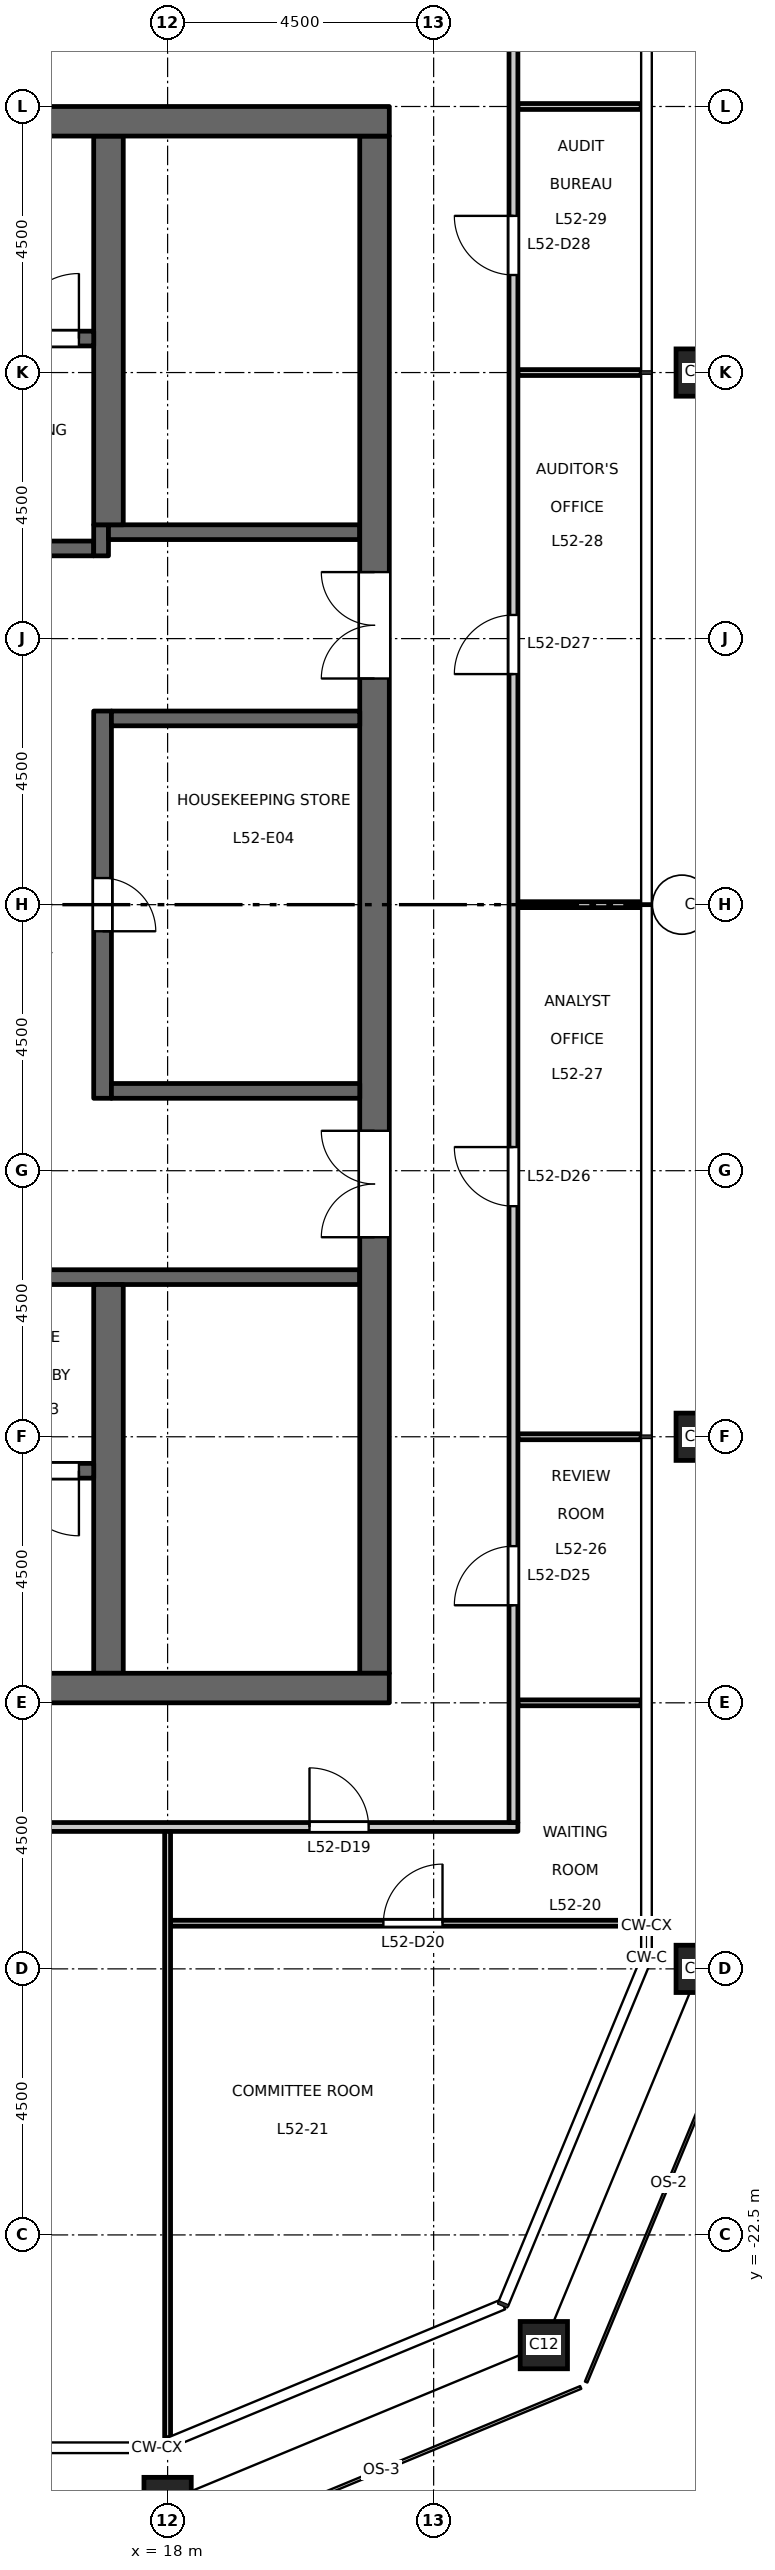
"""IFC4 building model, lengths in metres.
Left out: names, types, materials, properties, quantities, classifications, styles, units other than length and angle.
Written with IfcOpenShell. Run it as: python <this file> out.ifc"""

import sys

from ifc_helpers import new_model, si_unit, direction, frame, frame_2d, origin, origin_2d, place, context, subcontext, project, spatial, rectangle, hollow_rectangle, extrude, element, fill, save


model = new_model("IFC4")
c1 = context("Model", 3, precision=1e-05, world=origin(), true_north=direction((0.0, 1.0)))
c2 = subcontext(c1, "Body", "Model", "MODEL_VIEW")
j1 = project(units=[si_unit("LENGTHUNIT", "METRE"), si_unit("PLANEANGLEUNIT", "RADIAN")], contexts=[c1])
p1 = place(None, origin())
s1 = spatial("IfcSite", under=j1, at=p1, CompositionType="ELEMENT")
p2 = place(p1, origin())
s2 = spatial("IfcBuilding", under=s1, at=p2, CompositionType="ELEMENT")
p3 = place(p2, frame((0.0, 0.0, 242.2)))
s3 = spatial("IfcBuildingStorey", under=s2, at=p3, CompositionType="ELEMENT", Elevation=242.2)
for number, where, z_axis, x_axis in (
    (1, (18.0, -27.0, 0.0), (0.0, 0.0, 1.0), (1.0, 0.0, 0.0)),
    (2, (24.364, -24.364, 0.0), (0.0, 0.0, 1.0), (1.0, 0.0, 0.0)),
    (3, (27.0, -18.0, 0.0), (0.0, 0.0, 1.0), (1.0, 0.0, 0.0)),
    (4, (27.0, -9.0, 0.0), (0.0, 0.0, 1.0), (1.0, 0.0, 0.0)),
    (5, (27.0, 0.0, 0.0), (0.0, 0.0, 1.0), (1.0, 0.0, 0.0)),
    (6, (27.0, 9.0, 0.0), (0.0, 0.0, 1.0), (1.0, 0.0, 0.0)),
):
    element("IfcColumn", number, at=place(p3, frame(where, z_axis=z_axis, x_axis=x_axis)), inside=s3, PredefinedType="COLUMN", context=c2, shape_type="SweptSolid", body=[
        extrude(hollow_rectangle(XDim=0.8, YDim=0.8, WallThickness=0.045, at=origin_2d()), origin(), (0.0, 0.0, 1.0), 4.5),
    ])
p4 = place(p3, frame((12.15, 6.025, 0.0), z_axis=(0.0, 0.0, 1.0), x_axis=(1.0, 0.0, 0.0)))
e7 = element("IfcWall", 7, at=p4, inside=s3, PredefinedType="SHEAR", context=c2, shape_type="SweptSolid", body=[
    extrude(rectangle(XDim=4.6, YDim=0.25, at=frame_2d((2.3, 0.0))), origin(), (0.0, 0.0, 1.0), 4.35),
])
p5 = place(p4, frame((1.8, 0.0, 0.0)))
e8 = element("IfcOpeningElement", 8, at=p5, cuts=e7, PredefinedType="OPENING", context=c2, shape_type="SweptSolid", body=[
    extrude(rectangle(XDim=1.0, YDim=2.1, at=frame_2d((0.5, 1.05))), frame((0.0, 0.135, 0.0), z_axis=(0.0, -1.0, 0.0), x_axis=(1.0, 0.0, 0.0)), (0.0, 0.0, 1.0), 0.27),
])
p6 = place(p3, frame((16.875, 5.9, 0.0), z_axis=(0.0, 0.0, 1.0), x_axis=(0.0, 1.0, 0.0)))
e9 = element("IfcWall", 9, at=p6, inside=s3, PredefinedType="SHEAR", context=c2, shape_type="SweptSolid", body=[
    extrude(rectangle(XDim=0.525, YDim=0.25, at=frame_2d((0.263, 0.0))), origin(), (0.0, 0.0, 1.0), 4.35),
])
p7 = place(p3, frame((17.0, 6.3, 0.0), z_axis=(0.0, 0.0, 1.0), x_axis=(1.0, 0.0, 0.0)))
e10 = element("IfcWall", 10, at=p7, inside=s3, PredefinedType="SHEAR", context=c2, shape_type="SweptSolid", body=[
    extrude(rectangle(XDim=4.25, YDim=0.25, at=frame_2d((2.125, 0.0))), origin(), (0.0, 0.0, 1.0), 4.35),
])
p8 = place(p3, frame((12.15, -6.3, 0.0), z_axis=(0.0, 0.0, 1.0), x_axis=(1.0, 0.0, 0.0)))
e11 = element("IfcWall", 11, at=p8, inside=s3, PredefinedType="SHEAR", context=c2, shape_type="SweptSolid", body=[
    extrude(rectangle(XDim=9.1, YDim=0.25, at=frame_2d((4.55, 0.0))), origin(), (0.0, 0.0, 1.0), 4.35),
])
p9 = place(p8, frame((1.8, 0.0, 0.0)))
e12 = element("IfcOpeningElement", 12, at=p9, cuts=e11, PredefinedType="OPENING", context=c2, shape_type="SweptSolid", body=[
    extrude(rectangle(XDim=1.0, YDim=2.1, at=frame_2d((0.5, 1.05))), frame((0.0, 0.135, 0.0), z_axis=(0.0, -1.0, 0.0), x_axis=(1.0, 0.0, 0.0)), (0.0, 0.0, 1.0), 0.27),
])
p10 = place(p3, frame((21.5, -13.0, 0.0), z_axis=(0.0, 0.0, 1.0), x_axis=(0.0, 1.0, 0.0)))
e13 = element("IfcWall", 13, at=p10, inside=s3, PredefinedType="SHEAR", context=c2, shape_type="SweptSolid", body=[
    extrude(rectangle(XDim=26.0, YDim=0.5, at=frame_2d((13.0, 0.0))), origin(), (0.0, 0.0, 1.0), 4.35),
])
p11 = place(p10, frame((16.825, 0.0, 0.0)))
e14 = element("IfcOpeningElement", 14, at=p11, cuts=e13, PredefinedType="OPENING", context=c2, shape_type="SweptSolid", body=[
    extrude(rectangle(XDim=1.8, YDim=2.1, at=frame_2d((0.9, 1.05))), frame((0.0, 0.26, 0.0), z_axis=(0.0, -1.0, 0.0), x_axis=(1.0, 0.0, 0.0)), (0.0, 0.0, 1.0), 0.52),
])
p12 = place(p10, frame((7.375, 0.0, 0.0)))
e15 = element("IfcOpeningElement", 15, at=p12, cuts=e13, PredefinedType="OPENING", context=c2, shape_type="SweptSolid", body=[
    extrude(rectangle(XDim=1.8, YDim=2.1, at=frame_2d((0.9, 1.05))), frame((0.0, 0.26, 0.0), z_axis=(0.0, -1.0, 0.0), x_axis=(1.0, 0.0, 0.0)), (0.0, 0.0, 1.0), 0.52),
])
p13 = place(p3, frame((16.9, -3.275, 0.0), z_axis=(0.0, 0.0, 1.0), x_axis=(0.0, 1.0, 0.0)))
e16 = element("IfcWall", 16, at=p13, inside=s3, PredefinedType="SHEAR", context=c2, shape_type="SweptSolid", body=[
    extrude(rectangle(XDim=6.55, YDim=0.3, at=frame_2d((3.275, 0.0))), origin(), (0.0, 0.0, 1.0), 4.35),
])
p14 = place(p13, frame((2.825, 0.0, 0.0)))
e17 = element("IfcOpeningElement", 17, at=p14, cuts=e16, PredefinedType="OPENING", context=c2, shape_type="SweptSolid", body=[
    extrude(rectangle(XDim=0.9, YDim=2.1, at=frame_2d((0.45, 1.05))), frame((0.0, 0.16, 0.0), z_axis=(0.0, -1.0, 0.0), x_axis=(1.0, 0.0, 0.0)), (0.0, 0.0, 1.0), 0.32),
])
for number, where, z_axis, x_axis in (
    (18, (17.05, 3.15, 0.0), (0.0, 0.0, 1.0), (1.0, 0.0, 0.0)),
    (19, (17.05, -3.15, 0.0), (0.0, 0.0, 1.0), (1.0, 0.0, 0.0)),
):
    element("IfcWall", number, at=place(p3, frame(where, z_axis=z_axis, x_axis=x_axis)), inside=s3, PredefinedType="SHEAR", context=c2, shape_type="SweptSolid", body=[
        extrude(rectangle(XDim=4.2, YDim=0.25, at=frame_2d((2.1, 0.0))), origin(), (0.0, 0.0, 1.0), 4.35),
    ])
for number, where, z_axis, x_axis in (
    (20, (17.0, 6.425, 0.0), (0.0, 0.0, 1.0), (0.0, 1.0, 0.0)),
    (21, (17.0, -13.0, 0.0), (0.0, 0.0, 1.0), (0.0, 1.0, 0.0)),
):
    element("IfcWall", number, at=place(p3, frame(where, z_axis=z_axis, x_axis=x_axis)), inside=s3, PredefinedType="SHEAR", context=c2, shape_type="SweptSolid", body=[
        extrude(rectangle(XDim=6.575, YDim=0.5, at=frame_2d((3.288, 0.0))), origin(), (0.0, 0.0, 1.0), 4.35),
    ])
p15 = place(p3, frame((8.75, 9.575, 0.0), z_axis=(0.0, 0.0, 1.0), x_axis=(1.0, 0.0, 0.0)))
e22 = element("IfcWall", 22, at=p15, inside=s3, PredefinedType="SHEAR", context=c2, shape_type="SweptSolid", body=[
    extrude(rectangle(XDim=8.0, YDim=0.25, at=frame_2d((4.0, 0.0))), origin(), (0.0, 0.0, 1.0), 4.35),
])
p16 = place(p15, frame((6.65, 0.0, 0.0)))
e23 = element("IfcOpeningElement", 23, at=p16, cuts=e22, PredefinedType="OPENING", context=c2, shape_type="SweptSolid", body=[
    extrude(rectangle(XDim=1.1, YDim=2.1, at=frame_2d((0.55, 1.05))), frame((0.0, 0.135, 0.0), z_axis=(0.0, -1.0, 0.0), x_axis=(1.0, 0.0, 0.0)), (0.0, 0.0, 1.0), 0.27),
])
p17 = place(p3, frame((8.75, -9.575, 0.0), z_axis=(0.0, 0.0, 1.0), x_axis=(1.0, 0.0, 0.0)))
e24 = element("IfcWall", 24, at=p17, inside=s3, PredefinedType="SHEAR", context=c2, shape_type="SweptSolid", body=[
    extrude(rectangle(XDim=8.0, YDim=0.25, at=frame_2d((4.0, 0.0))), origin(), (0.0, 0.0, 1.0), 4.35),
])
p18 = place(p17, frame((6.65, 0.0, 0.0)))
e25 = element("IfcOpeningElement", 25, at=p18, cuts=e24, PredefinedType="OPENING", context=c2, shape_type="SweptSolid", body=[
    extrude(rectangle(XDim=1.1, YDim=2.1, at=frame_2d((0.55, 1.05))), frame((0.0, 0.135, 0.0), z_axis=(0.0, -1.0, 0.0), x_axis=(1.0, 0.0, 0.0)), (0.0, 0.0, 1.0), 0.27),
])
for number, where, z_axis, x_axis in (
    (26, (8.25, 13.25, 0.0), (0.0, 0.0, 1.0), (1.0, 0.0, 0.0)),
    (27, (8.25, -13.25, 0.0), (0.0, 0.0, 1.0), (1.0, 0.0, 0.0)),
):
    element("IfcWall", number, at=place(p3, frame(where, z_axis=z_axis, x_axis=x_axis)), inside=s3, PredefinedType="SHEAR", context=c2, shape_type="SweptSolid", body=[
        extrude(rectangle(XDim=13.5, YDim=0.5, at=frame_2d((6.75, 0.0))), origin(), (0.0, 0.0, 1.0), 4.35),
    ])
p19 = place(p3, frame((18.05, -17.228, 0.0), z_axis=(0.0, 0.0, 1.0), x_axis=(1.0, 0.0, 0.0)))
e28 = element("IfcWall", 28, at=p19, inside=s3, PredefinedType="PARTITIONING", context=c2, shape_type="SweptSolid", body=[
    extrude(rectangle(XDim=7.96, YDim=0.1, at=frame_2d((3.98, 0.0))), origin(), (0.0, 0.0, 1.0), 4.35),
])
p20 = place(p19, frame((3.6, 0.0, 0.0)))
e29 = element("IfcOpeningElement", 29, at=p20, cuts=e28, PredefinedType="OPENING", context=c2, shape_type="SweptSolid", body=[
    extrude(rectangle(XDim=1.0, YDim=2.1, at=frame_2d((0.5, 1.05))), frame((0.0, 0.06, 0.0), z_axis=(0.0, -1.0, 0.0), x_axis=(1.0, 0.0, 0.0)), (0.0, 0.0, 1.0), 0.12),
])
p21 = place(p3, frame((-23.925, -15.6, 0.0), z_axis=(0.0, 0.0, 1.0), x_axis=(1.0, 0.0, 0.0)))
e30 = element("IfcWall", 30, at=p21, inside=s3, PredefinedType="PARTITIONING", context=c2, shape_type="SweptSolid", body=[
    extrude(rectangle(XDim=47.85, YDim=0.15, at=frame_2d((23.925, 0.0))), origin(), (0.0, 0.0, 1.0), 4.35),
])
p22 = place(p21, frame((9.825, 0.0, 0.0)))
e31 = element("IfcOpeningElement", 31, at=p22, cuts=e30, PredefinedType="OPENING", context=c2, shape_type="SweptSolid", body=[
    extrude(rectangle(XDim=1.0, YDim=2.1, at=frame_2d((0.5, 1.05))), frame((0.0, 0.085, 0.0), z_axis=(0.0, -1.0, 0.0), x_axis=(1.0, 0.0, 0.0)), (0.0, 0.0, 1.0), 0.17),
])
p23 = place(p21, frame((18.825, 0.0, 0.0)))
e32 = element("IfcOpeningElement", 32, at=p23, cuts=e30, PredefinedType="OPENING", context=c2, shape_type="SweptSolid", body=[
    extrude(rectangle(XDim=1.0, YDim=2.1, at=frame_2d((0.5, 1.05))), frame((0.0, 0.085, 0.0), z_axis=(0.0, -1.0, 0.0), x_axis=(1.0, 0.0, 0.0)), (0.0, 0.0, 1.0), 0.17),
])
p24 = place(p21, frame((27.825, 0.0, 0.0)))
e33 = element("IfcOpeningElement", 33, at=p24, cuts=e30, PredefinedType="OPENING", context=c2, shape_type="SweptSolid", body=[
    extrude(rectangle(XDim=1.0, YDim=2.1, at=frame_2d((0.5, 1.05))), frame((0.0, 0.085, 0.0), z_axis=(0.0, -1.0, 0.0), x_axis=(1.0, 0.0, 0.0)), (0.0, 0.0, 1.0), 0.17),
])
p25 = place(p21, frame((36.825, 0.0, 0.0)))
e34 = element("IfcOpeningElement", 34, at=p25, cuts=e30, PredefinedType="OPENING", context=c2, shape_type="SweptSolid", body=[
    extrude(rectangle(XDim=1.0, YDim=2.1, at=frame_2d((0.5, 1.05))), frame((0.0, 0.085, 0.0), z_axis=(0.0, -1.0, 0.0), x_axis=(1.0, 0.0, 0.0)), (0.0, 0.0, 1.0), 0.17),
])
p26 = place(p21, frame((2.475, 0.0, 0.0)))
e35 = element("IfcOpeningElement", 35, at=p26, cuts=e30, PredefinedType="OPENING", context=c2, shape_type="SweptSolid", body=[
    extrude(rectangle(XDim=1.0, YDim=2.1, at=frame_2d((0.5, 1.05))), frame((0.0, 0.085, 0.0), z_axis=(0.0, -1.0, 0.0), x_axis=(1.0, 0.0, 0.0)), (0.0, 0.0, 1.0), 0.17),
])
p27 = place(p21, frame((44.325, 0.0, 0.0)))
e36 = element("IfcOpeningElement", 36, at=p27, cuts=e30, PredefinedType="OPENING", context=c2, shape_type="SweptSolid", body=[
    extrude(rectangle(XDim=1.0, YDim=2.1, at=frame_2d((0.5, 1.05))), frame((0.0, 0.085, 0.0), z_axis=(0.0, -1.0, 0.0), x_axis=(1.0, 0.0, 0.0)), (0.0, 0.0, 1.0), 0.17),
])
p28 = place(p3, frame((23.925, -13.5, 0.0), z_axis=(0.0, 0.0, 1.0), x_axis=(1.0, 0.0, 0.0)))
e37 = element("IfcWall", 37, at=p28, inside=s3, PredefinedType="PARTITIONING", context=c2, shape_type="SweptSolid", body=[
    extrude(rectangle(XDim=2.085, YDim=0.1, at=frame_2d((1.042, 0.0))), origin(), (0.0, 0.0, 1.0), 3.95),
])
for number, where, z_axis, x_axis in (
    (38, (23.925, -9.0, 0.0), (0.0, 0.0, 1.0), (1.0, 0.0, 0.0)),
    (39, (23.925, 0.0, 0.0), (0.0, 0.0, 1.0), (1.0, 0.0, 0.0)),
    (40, (23.925, 9.0, 0.0), (0.0, 0.0, 1.0), (1.0, 0.0, 0.0)),
    (41, (23.925, 13.5, 0.0), (0.0, 0.0, 1.0), (1.0, 0.0, 0.0)),
):
    element("IfcWall", number, at=place(p3, frame(where, z_axis=z_axis, x_axis=x_axis)), inside=s3, PredefinedType="PARTITIONING", context=c2, shape_type="SweptSolid", body=[
        extrude(rectangle(XDim=2.085, YDim=0.1, at=frame_2d((1.042, 0.0))), origin(), (0.0, 0.0, 1.0), 4.35),
    ])
p29 = place(p3, frame((18.0, -25.928, 0.0), z_axis=(0.0, 0.0, 1.0), x_axis=(0.0, 1.0, 0.0)))
e42 = element("IfcWall", 42, at=p29, inside=s3, PredefinedType="PARTITIONING", context=c2, shape_type="SweptSolid", body=[
    extrude(rectangle(XDim=10.253, YDim=0.1, at=frame_2d((5.126, 0.0))), origin(), (0.0, 0.0, 1.0), 3.65),
])
p30 = place(p3, frame((23.85, -15.525, 0.0), z_axis=(0.0, 0.0, 1.0), x_axis=(0.0, 1.0, 0.0)))
e43 = element("IfcWall", 43, at=p30, inside=s3, PredefinedType="PARTITIONING", context=c2, shape_type="SweptSolid", body=[
    extrude(rectangle(XDim=31.05, YDim=0.15, at=frame_2d((15.525, 0.0))), origin(), (0.0, 0.0, 1.0), 4.35),
])
p31 = place(p30, frame((3.675, 0.0, 0.0)))
e44 = element("IfcOpeningElement", 44, at=p31, cuts=e43, PredefinedType="OPENING", context=c2, shape_type="SweptSolid", body=[
    extrude(rectangle(XDim=1.0, YDim=2.1, at=frame_2d((0.5, 1.05))), frame((0.0, 0.085, 0.0), z_axis=(0.0, -1.0, 0.0), x_axis=(1.0, 0.0, 0.0)), (0.0, 0.0, 1.0), 0.17),
])
p32 = place(p30, frame((10.425, 0.0, 0.0)))
e45 = element("IfcOpeningElement", 45, at=p32, cuts=e43, PredefinedType="OPENING", context=c2, shape_type="SweptSolid", body=[
    extrude(rectangle(XDim=1.0, YDim=2.1, at=frame_2d((0.5, 1.05))), frame((0.0, 0.085, 0.0), z_axis=(0.0, -1.0, 0.0), x_axis=(1.0, 0.0, 0.0)), (0.0, 0.0, 1.0), 0.17),
])
p33 = place(p30, frame((19.425, 0.0, 0.0)))
e46 = element("IfcOpeningElement", 46, at=p33, cuts=e43, PredefinedType="OPENING", context=c2, shape_type="SweptSolid", body=[
    extrude(rectangle(XDim=1.0, YDim=2.1, at=frame_2d((0.5, 1.05))), frame((0.0, 0.085, 0.0), z_axis=(0.0, -1.0, 0.0), x_axis=(1.0, 0.0, 0.0)), (0.0, 0.0, 1.0), 0.17),
])
p34 = place(p30, frame((26.175, 0.0, 0.0)))
e47 = element("IfcOpeningElement", 47, at=p34, cuts=e43, PredefinedType="OPENING", context=c2, shape_type="SweptSolid", body=[
    extrude(rectangle(XDim=1.0, YDim=2.1, at=frame_2d((0.5, 1.05))), frame((0.0, 0.085, 0.0), z_axis=(0.0, -1.0, 0.0), x_axis=(1.0, 0.0, 0.0)), (0.0, 0.0, 1.0), 0.17),
])
p35 = place(p16, origin())
e48 = element("IfcDoor", 48, at=p35, inside=s3, OperationType="SINGLE_SWING_LEFT", PredefinedType="DOOR", context=c2, shape_type="SweptSolid", body=[
    extrude(rectangle(XDim=1.1, YDim=2.1, at=frame_2d((0.55, 1.05))), frame((0.0, 0.025, 0.0), z_axis=(0.0, -1.0, 0.0), x_axis=(1.0, 0.0, 0.0)), (0.0, 0.0, 1.0), 0.05),
])
fill(e23, e48)
p36 = place(p18, origin())
e49 = element("IfcDoor", 49, at=p36, inside=s3, OperationType="SINGLE_SWING_RIGHT", PredefinedType="DOOR", context=c2, shape_type="SweptSolid", body=[
    extrude(rectangle(XDim=1.1, YDim=2.1, at=frame_2d((0.55, 1.05))), frame((0.0, 0.025, 0.0), z_axis=(0.0, -1.0, 0.0), x_axis=(1.0, 0.0, 0.0)), (0.0, 0.0, 1.0), 0.05),
])
fill(e25, e49)
p37 = place(p11, origin())
e50 = element("IfcDoor", 50, at=p37, inside=s3, OperationType="DOUBLE_DOOR_DOUBLE_SWING", PredefinedType="DOOR", context=c2, shape_type="SweptSolid", body=[
    extrude(rectangle(XDim=1.8, YDim=2.1, at=frame_2d((0.9, 1.05))), frame((0.0, 0.025, 0.0), z_axis=(0.0, -1.0, 0.0), x_axis=(1.0, 0.0, 0.0)), (0.0, 0.0, 1.0), 0.05),
])
fill(e14, e50)
p38 = place(p12, origin())
e51 = element("IfcDoor", 51, at=p38, inside=s3, OperationType="DOUBLE_DOOR_DOUBLE_SWING", PredefinedType="DOOR", context=c2, shape_type="SweptSolid", body=[
    extrude(rectangle(XDim=1.8, YDim=2.1, at=frame_2d((0.9, 1.05))), frame((0.0, 0.025, 0.0), z_axis=(0.0, -1.0, 0.0), x_axis=(1.0, 0.0, 0.0)), (0.0, 0.0, 1.0), 0.05),
])
fill(e15, e51)
p39 = place(p14, origin())
e52 = element("IfcDoor", 52, at=p39, inside=s3, OperationType="SINGLE_SWING_LEFT", PredefinedType="DOOR", context=c2, shape_type="SweptSolid", body=[
    extrude(rectangle(XDim=0.9, YDim=2.1, at=frame_2d((0.45, 1.05))), frame((0.0, 0.025, 0.0), z_axis=(0.0, -1.0, 0.0), x_axis=(1.0, 0.0, 0.0)), (0.0, 0.0, 1.0), 0.05),
])
fill(e17, e52)
p40 = place(p27, origin())
e53 = element("IfcDoor", 53, at=p40, inside=s3, OperationType="SINGLE_SWING_LEFT", PredefinedType="DOOR", context=c2, shape_type="SweptSolid", body=[
    extrude(rectangle(XDim=1.0, YDim=2.1, at=frame_2d((0.5, 1.05))), frame((0.0, 0.025, 0.0), z_axis=(0.0, -1.0, 0.0), x_axis=(1.0, 0.0, 0.0)), (0.0, 0.0, 1.0), 0.05),
])
fill(e36, e53)
p41 = place(p20, origin())
e54 = element("IfcDoor", 54, at=p41, inside=s3, OperationType="SINGLE_SWING_RIGHT", PredefinedType="DOOR", context=c2, shape_type="SweptSolid", body=[
    extrude(rectangle(XDim=1.0, YDim=2.1, at=frame_2d((0.5, 1.05))), frame((0.0, 0.025, 0.0), z_axis=(0.0, -1.0, 0.0), x_axis=(1.0, 0.0, 0.0)), (0.0, 0.0, 1.0), 0.05),
])
fill(e29, e54)
p42 = place(p31, origin())
e55 = element("IfcDoor", 55, at=p42, inside=s3, OperationType="SINGLE_SWING_LEFT", PredefinedType="DOOR", context=c2, shape_type="SweptSolid", body=[
    extrude(rectangle(XDim=1.0, YDim=2.1, at=frame_2d((0.5, 1.05))), frame((0.0, 0.025, 0.0), z_axis=(0.0, -1.0, 0.0), x_axis=(1.0, 0.0, 0.0)), (0.0, 0.0, 1.0), 0.05),
])
fill(e44, e55)
p43 = place(p32, origin())
e56 = element("IfcDoor", 56, at=p43, inside=s3, OperationType="SINGLE_SWING_RIGHT", PredefinedType="DOOR", context=c2, shape_type="SweptSolid", body=[
    extrude(rectangle(XDim=1.0, YDim=2.1, at=frame_2d((0.5, 1.05))), frame((0.0, 0.025, 0.0), z_axis=(0.0, -1.0, 0.0), x_axis=(1.0, 0.0, 0.0)), (0.0, 0.0, 1.0), 0.05),
])
fill(e45, e56)
p44 = place(p33, origin())
e57 = element("IfcDoor", 57, at=p44, inside=s3, OperationType="SINGLE_SWING_LEFT", PredefinedType="DOOR", context=c2, shape_type="SweptSolid", body=[
    extrude(rectangle(XDim=1.0, YDim=2.1, at=frame_2d((0.5, 1.05))), frame((0.0, 0.025, 0.0), z_axis=(0.0, -1.0, 0.0), x_axis=(1.0, 0.0, 0.0)), (0.0, 0.0, 1.0), 0.05),
])
fill(e46, e57)
p45 = place(p34, origin())
e58 = element("IfcDoor", 58, at=p45, inside=s3, OperationType="SINGLE_SWING_RIGHT", PredefinedType="DOOR", context=c2, shape_type="SweptSolid", body=[
    extrude(rectangle(XDim=1.0, YDim=2.1, at=frame_2d((0.5, 1.05))), frame((0.0, 0.025, 0.0), z_axis=(0.0, -1.0, 0.0), x_axis=(1.0, 0.0, 0.0)), (0.0, 0.0, 1.0), 0.05),
])
fill(e47, e58)
save(model, sys.argv[1])
